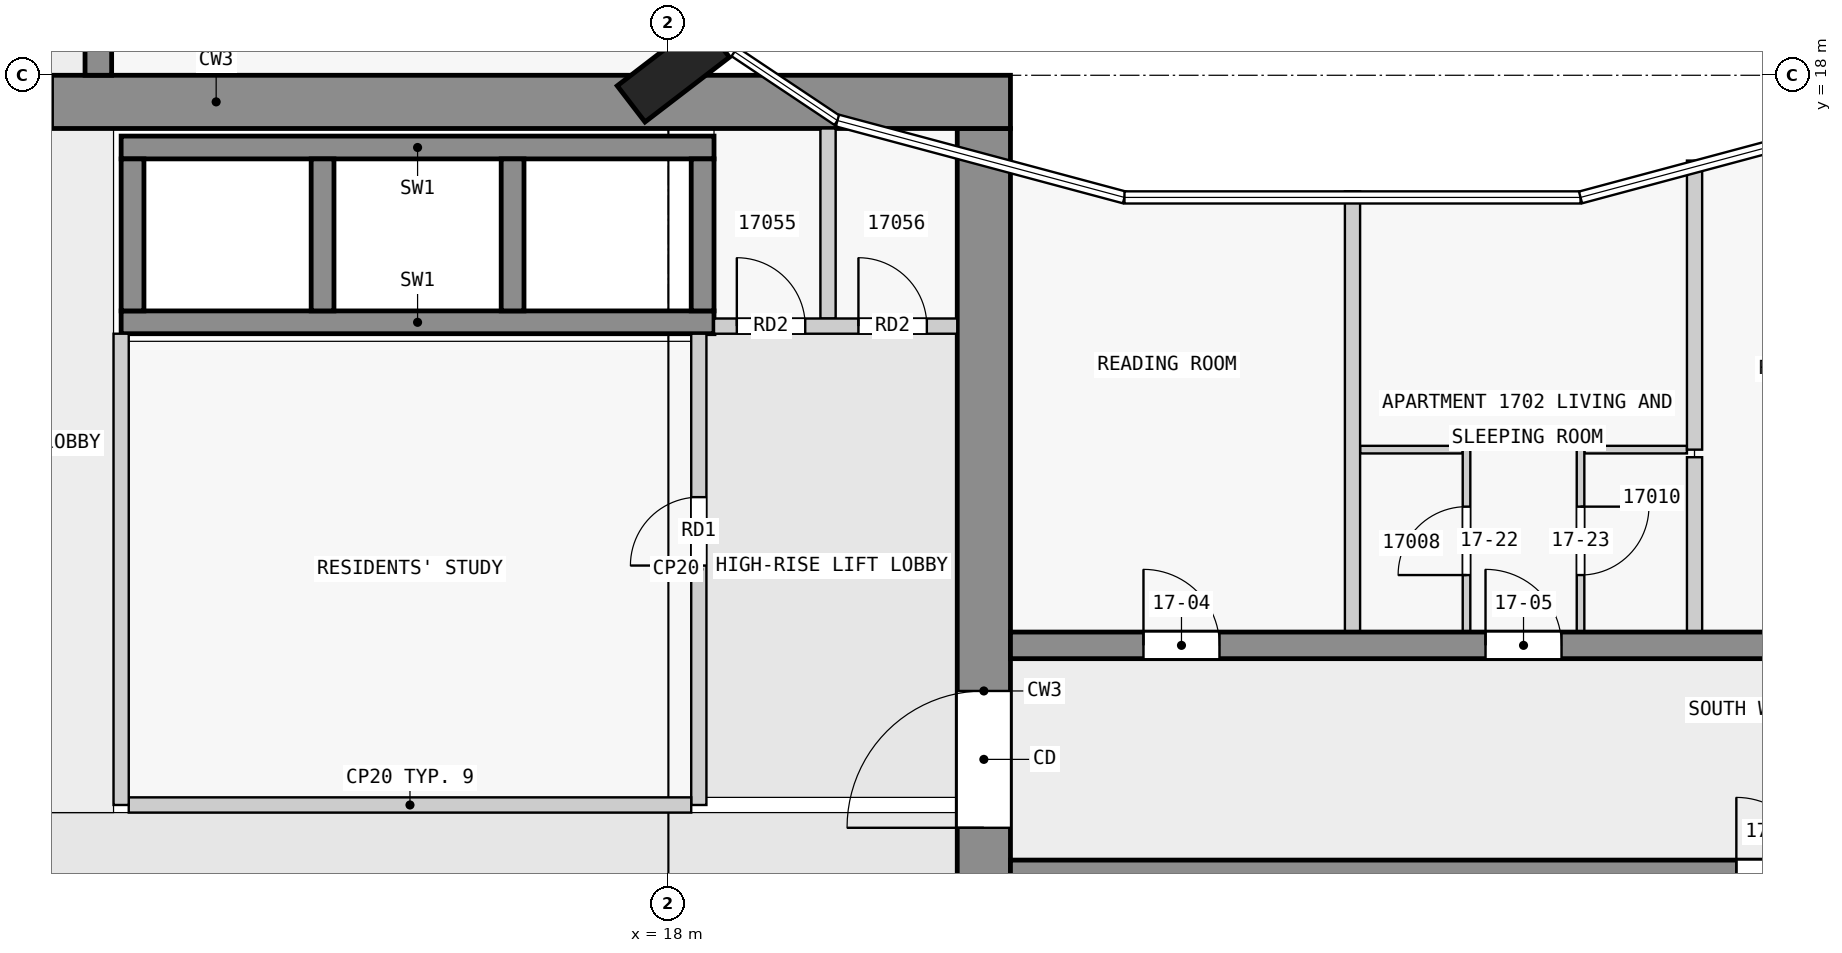
"""IFC4 building model, lengths in metres.
Left out: names, types, materials, properties, quantities, classifications, styles, units other than length and angle.
Written with IfcOpenShell. Run it as: python <this file> out.ifc"""

import sys

from ifc_helpers import new_model, si_unit, direction, frame, frame_2d, origin, origin_2d, place, context, subcontext, project, spatial, rectangle, extrude, element, fill, save


model = new_model("IFC4")
c1 = context("Model", 3, precision=1e-05, world=origin(), true_north=direction((0.0, 1.0)))
c2 = subcontext(c1, "Body", "Model", "MODEL_VIEW")
j1 = project(units=[si_unit("LENGTHUNIT", "METRE"), si_unit("PLANEANGLEUNIT", "RADIAN")], contexts=[c1])
p1 = place(None, origin())
s1 = spatial("IfcSite", under=j1, at=p1, CompositionType="ELEMENT")
p2 = place(p1, origin())
s2 = spatial("IfcBuilding", under=s1, at=p2, CompositionType="ELEMENT")
p3 = place(p2, frame((0.0, 0.0, 68.8)))
s3 = spatial("IfcBuildingStorey", under=s2, at=p3, CompositionType="ELEMENT", Elevation=68.8)
p4 = place(p3, frame((18.065, 18.05, 0.0), z_axis=(0.0, 0.0, 1.0), x_axis=(-0.608810846443, 0.793315418515, 0.0)))
e1 = element("IfcColumn", 1, at=p4, inside=s3, PredefinedType="COLUMN", context=c2, shape_type="SweptSolid", body=[
    extrude(rectangle(XDim=0.6, YDim=1.4, at=origin_2d()), origin(), (0.0, 0.0, 1.0), 3.5),
])
p5 = place(p3, frame((1.6, 17.65, 0.0), z_axis=(0.0, 0.0, 1.0), x_axis=(1.0, 0.0, 0.0)))
e2 = element("IfcWall", 2, at=p5, inside=s3, PredefinedType="SHEAR", context=c2, shape_type="SweptSolid", body=[
    extrude(rectangle(XDim=20.9, YDim=0.7, at=frame_2d((10.45, 0.0))), origin(), (0.0, 0.0, 1.0), 3.2),
])
p6 = place(p5, frame((6.5, 0.0, 0.0)))
e3 = element("IfcOpeningElement", 3, at=p6, cuts=e2, PredefinedType="OPENING", context=c2, shape_type="SweptSolid", body=[
    extrude(rectangle(XDim=1.8, YDim=2.1, at=frame_2d((0.9, 1.05))), frame((0.0, 0.36, 0.0), z_axis=(0.0, -1.0, 0.0), x_axis=(1.0, 0.0, 0.0)), (0.0, 0.0, 1.0), 0.72),
])
p7 = place(p3, frame((22.15, 2.5, 0.0), z_axis=(0.0, 0.0, 1.0), x_axis=(0.0, 1.0, 0.0)))
e4 = element("IfcWall", 4, at=p7, inside=s3, PredefinedType="SHEAR", context=c2, shape_type="SweptSolid", body=[
    extrude(rectangle(XDim=14.8, YDim=0.7, at=frame_2d((7.4, 0.0))), origin(), (0.0, 0.0, 1.0), 3.2),
])
p8 = place(p7, frame((5.6, 0.0, 0.0)))
e5 = element("IfcOpeningElement", 5, at=p8, cuts=e4, PredefinedType="OPENING", context=c2, shape_type="SweptSolid", body=[
    extrude(rectangle(XDim=1.8, YDim=2.1, at=frame_2d((0.9, 1.05))), frame((0.0, 0.36, 0.0), z_axis=(0.0, -1.0, 0.0), x_axis=(1.0, 0.0, 0.0)), (0.0, 0.0, 1.0), 0.72),
])
for number, where, z_axis, x_axis in (
    (6, (10.8, 17.05, 0.0), (0.0, 0.0, 1.0), (1.0, 0.0, 0.0)),
    (7, (10.8, 14.75, 0.0), (0.0, 0.0, 1.0), (1.0, 0.0, 0.0)),
):
    element("IfcWall", number, at=place(p3, frame(where, z_axis=z_axis, x_axis=x_axis)), inside=s3, PredefinedType="SHEAR", context=c2, shape_type="SweptSolid", body=[
        extrude(rectangle(XDim=7.8, YDim=0.3, at=frame_2d((3.9, 0.0))), origin(), (0.0, 0.0, 1.0), 3.2),
    ])
for number, where, z_axis, x_axis in (
    (8, (10.95, 14.9, 0.0), (0.0, 0.0, 1.0), (0.0, 1.0, 0.0)),
    (9, (13.45, 14.9, 0.0), (0.0, 0.0, 1.0), (0.0, 1.0, 0.0)),
    (10, (15.95, 14.9, 0.0), (0.0, 0.0, 1.0), (0.0, 1.0, 0.0)),
    (11, (18.45, 14.9, 0.0), (0.0, 0.0, 1.0), (0.0, 1.0, 0.0)),
):
    element("IfcWall", number, at=place(p3, frame(where, z_axis=z_axis, x_axis=x_axis)), inside=s3, PredefinedType="SHEAR", context=c2, shape_type="SweptSolid", body=[
        extrude(rectangle(XDim=2.0, YDim=0.3, at=frame_2d((1.0, 0.0))), origin(), (0.0, 0.0, 1.0), 3.2),
    ])
p9 = place(p3, frame((22.5, 7.5, 0.0), z_axis=(0.0, 0.0, 1.0), x_axis=(1.0, 0.0, 0.0)))
e12 = element("IfcWall", 12, at=p9, inside=s3, PredefinedType="SHEAR", context=c2, shape_type="SweptSolid", body=[
    extrude(rectangle(XDim=22.5, YDim=0.35, at=frame_2d((11.25, 0.0))), origin(), (0.0, 0.0, 1.0), 3.2),
])
p10 = place(p9, frame((9.55, 0.0, 0.0)))
e13 = element("IfcOpeningElement", 13, at=p10, cuts=e12, PredefinedType="OPENING", context=c2, shape_type="SweptSolid", body=[
    extrude(rectangle(XDim=1.0, YDim=2.1, at=frame_2d((0.5, 1.05))), frame((0.0, 0.185, 0.0), z_axis=(0.0, -1.0, 0.0), x_axis=(1.0, 0.0, 0.0)), (0.0, 0.0, 1.0), 0.37),
])
p11 = place(p9, frame((18.75, 0.0, 0.0)))
e14 = element("IfcOpeningElement", 14, at=p11, cuts=e12, PredefinedType="OPENING", context=c2, shape_type="SweptSolid", body=[
    extrude(rectangle(XDim=0.9, YDim=2.1, at=frame_2d((0.45, 1.05))), frame((0.0, 0.185, 0.0), z_axis=(0.0, -1.0, 0.0), x_axis=(1.0, 0.0, 0.0)), (0.0, 0.0, 1.0), 0.37),
])
p12 = place(p9, frame((20.95, 0.0, 0.0)))
e15 = element("IfcOpeningElement", 15, at=p12, cuts=e12, PredefinedType="OPENING", context=c2, shape_type="SweptSolid", body=[
    extrude(rectangle(XDim=1.0, YDim=2.1, at=frame_2d((0.5, 1.05))), frame((0.0, 0.185, 0.0), z_axis=(0.0, -1.0, 0.0), x_axis=(1.0, 0.0, 0.0)), (0.0, 0.0, 1.0), 0.37),
])
p13 = place(p3, frame((22.5, 10.5, 0.0), z_axis=(0.0, 0.0, 1.0), x_axis=(1.0, 0.0, 0.0)))
e16 = element("IfcWall", 16, at=p13, inside=s3, PredefinedType="SHEAR", context=c2, shape_type="SweptSolid", body=[
    extrude(rectangle(XDim=22.5, YDim=0.35, at=frame_2d((11.25, 0.0))), origin(), (0.0, 0.0, 1.0), 3.2),
])
p14 = place(p13, frame((1.75, 0.0, 0.0)))
e17 = element("IfcOpeningElement", 17, at=p14, cuts=e16, PredefinedType="OPENING", context=c2, shape_type="SweptSolid", body=[
    extrude(rectangle(XDim=1.0, YDim=2.1, at=frame_2d((0.5, 1.05))), frame((0.0, 0.185, 0.0), z_axis=(0.0, -1.0, 0.0), x_axis=(1.0, 0.0, 0.0)), (0.0, 0.0, 1.0), 0.37),
])
p15 = place(p13, frame((6.25, 0.0, 0.0)))
e18 = element("IfcOpeningElement", 18, at=p15, cuts=e16, PredefinedType="OPENING", context=c2, shape_type="SweptSolid", body=[
    extrude(rectangle(XDim=1.0, YDim=2.1, at=frame_2d((0.5, 1.05))), frame((0.0, 0.185, 0.0), z_axis=(0.0, -1.0, 0.0), x_axis=(1.0, 0.0, 0.0)), (0.0, 0.0, 1.0), 0.37),
])
p16 = place(p13, frame((10.75, 0.0, 0.0)))
e19 = element("IfcOpeningElement", 19, at=p16, cuts=e16, PredefinedType="OPENING", context=c2, shape_type="SweptSolid", body=[
    extrude(rectangle(XDim=1.0, YDim=2.1, at=frame_2d((0.5, 1.05))), frame((0.0, 0.185, 0.0), z_axis=(0.0, -1.0, 0.0), x_axis=(1.0, 0.0, 0.0)), (0.0, 0.0, 1.0), 0.37),
])
p17 = place(p13, frame((16.85, 0.0, 0.0)))
e20 = element("IfcOpeningElement", 20, at=p17, cuts=e16, PredefinedType="OPENING", context=c2, shape_type="SweptSolid", body=[
    extrude(rectangle(XDim=1.0, YDim=2.1, at=frame_2d((0.5, 1.05))), frame((0.0, 0.185, 0.0), z_axis=(0.0, -1.0, 0.0), x_axis=(1.0, 0.0, 0.0)), (0.0, 0.0, 1.0), 0.37),
])
p18 = place(p3, frame((10.5, 18.0, 0.0), z_axis=(0.0, 0.0, 1.0), x_axis=(0.0, 1.0, 0.0)))
e21 = element("IfcWall", 21, at=p18, inside=s3, PredefinedType="SHEAR", context=c2, shape_type="SweptSolid", body=[
    extrude(rectangle(XDim=27.0, YDim=0.35, at=frame_2d((13.5, 0.0))), origin(), (0.0, 0.0, 1.0), 3.2),
])
p19 = place(p18, frame((4.05, 0.0, 0.0)))
e22 = element("IfcOpeningElement", 22, at=p19, cuts=e21, PredefinedType="OPENING", context=c2, shape_type="SweptSolid", body=[
    extrude(rectangle(XDim=1.0, YDim=2.1, at=frame_2d((0.5, 1.05))), frame((0.0, 0.185, 0.0), z_axis=(0.0, -1.0, 0.0), x_axis=(1.0, 0.0, 0.0)), (0.0, 0.0, 1.0), 0.37),
])
p20 = place(p18, frame((13.05, 0.0, 0.0)))
e23 = element("IfcOpeningElement", 23, at=p20, cuts=e21, PredefinedType="OPENING", context=c2, shape_type="SweptSolid", body=[
    extrude(rectangle(XDim=1.0, YDim=2.1, at=frame_2d((0.5, 1.05))), frame((0.0, 0.185, 0.0), z_axis=(0.0, -1.0, 0.0), x_axis=(1.0, 0.0, 0.0)), (0.0, 0.0, 1.0), 0.37),
])
p21 = place(p18, frame((21.35, 0.0, 0.0)))
e24 = element("IfcOpeningElement", 24, at=p21, cuts=e21, PredefinedType="OPENING", context=c2, shape_type="SweptSolid", body=[
    extrude(rectangle(XDim=1.0, YDim=2.1, at=frame_2d((0.5, 1.05))), frame((0.0, 0.185, 0.0), z_axis=(0.0, -1.0, 0.0), x_axis=(1.0, 0.0, 0.0)), (0.0, 0.0, 1.0), 0.37),
])
p22 = place(p3, frame((10.8, 8.4, 0.0), z_axis=(0.0, 0.0, 1.0), x_axis=(0.0, 1.0, 0.0)))
e25 = element("IfcWall", 25, at=p22, inside=s3, PredefinedType="PARTITIONING", context=c2, shape_type="SweptSolid", body=[
    extrude(rectangle(XDim=6.2, YDim=0.2, at=frame_2d((3.1, 0.0))), origin(), (0.0, 0.0, 1.0), 3.2),
])
p23 = place(p3, frame((10.9, 8.4, 0.0), z_axis=(0.0, 0.0, 1.0), x_axis=(1.0, 0.0, 0.0)))
e26 = element("IfcWall", 26, at=p23, inside=s3, PredefinedType="PARTITIONING", context=c2, shape_type="SweptSolid", body=[
    extrude(rectangle(XDim=7.4, YDim=0.2, at=frame_2d((3.7, 0.0))), origin(), (0.0, 0.0, 1.0), 3.2),
])
p24 = place(p3, frame((18.4, 8.4, 0.0), z_axis=(0.0, 0.0, 1.0), x_axis=(0.0, 1.0, 0.0)))
e27 = element("IfcWall", 27, at=p24, inside=s3, PredefinedType="PARTITIONING", context=c2, shape_type="SweptSolid", body=[
    extrude(rectangle(XDim=6.2, YDim=0.2, at=frame_2d((3.1, 0.0))), origin(), (0.0, 0.0, 1.0), 3.2),
])
p25 = place(p24, frame((3.15, 0.0, 0.0)))
e28 = element("IfcOpeningElement", 28, at=p25, cuts=e27, PredefinedType="OPENING", context=c2, shape_type="SweptSolid", body=[
    extrude(rectangle(XDim=0.9, YDim=2.1, at=frame_2d((0.45, 1.05))), frame((0.0, 0.11, 0.0), z_axis=(0.0, -1.0, 0.0), x_axis=(1.0, 0.0, 0.0)), (0.0, 0.0, 1.0), 0.22),
])
p26 = place(p3, frame((18.6, 14.7, 0.0), z_axis=(0.0, 0.0, 1.0), x_axis=(1.0, 0.0, 0.0)))
e29 = element("IfcWall", 29, at=p26, inside=s3, PredefinedType="PARTITIONING", context=c2, shape_type="SweptSolid", body=[
    extrude(rectangle(XDim=3.2, YDim=0.2, at=frame_2d((1.6, 0.0))), origin(), (0.0, 0.0, 1.0), 3.2),
])
p27 = place(p26, frame((0.3, 0.0, 0.0)))
e30 = element("IfcOpeningElement", 30, at=p27, cuts=e29, PredefinedType="OPENING", context=c2, shape_type="SweptSolid", body=[
    extrude(rectangle(XDim=0.9, YDim=2.1, at=frame_2d((0.45, 1.05))), frame((0.0, 0.11, 0.0), z_axis=(0.0, -1.0, 0.0), x_axis=(1.0, 0.0, 0.0)), (0.0, 0.0, 1.0), 0.22),
])
p28 = place(p26, frame((1.9, 0.0, 0.0)))
e31 = element("IfcOpeningElement", 31, at=p28, cuts=e29, PredefinedType="OPENING", context=c2, shape_type="SweptSolid", body=[
    extrude(rectangle(XDim=0.9, YDim=2.1, at=frame_2d((0.45, 1.05))), frame((0.0, 0.11, 0.0), z_axis=(0.0, -1.0, 0.0), x_axis=(1.0, 0.0, 0.0)), (0.0, 0.0, 1.0), 0.22),
])
p29 = place(p3, frame((20.1, 14.8, 0.0), z_axis=(0.0, 0.0, 1.0), x_axis=(0.0, 1.0, 0.0)))
e32 = element("IfcWall", 32, at=p29, inside=s3, PredefinedType="PARTITIONING", context=c2, shape_type="SweptSolid", body=[
    extrude(rectangle(XDim=2.5, YDim=0.2, at=frame_2d((1.25, 0.0))), origin(), (0.0, 0.0, 1.0), 3.2),
])
for number, where, z_axis, x_axis in (
    (33, (28.45, 13.075, 0.0), (0.0, 0.0, 1.0), (-1.0, 0.0, 0.0)),
    (34, (31.4, 13.075, 0.0), (0.0, 0.0, 1.0), (-1.0, 0.0, 0.0)),
):
    element("IfcWall", number, at=place(p3, frame(where, z_axis=z_axis, x_axis=x_axis)), inside=s3, PredefinedType="PARTITIONING", context=c2, shape_type="SweptSolid", body=[
        extrude(rectangle(XDim=1.35, YDim=0.1, at=frame_2d((0.675, 0.0))), origin(), (0.0, 0.0, 1.0), 3.2),
    ])
p30 = place(p3, frame((27.0, 10.675, 0.0), z_axis=(0.0, 0.0, 1.0), x_axis=(0.0, 1.0, 0.0)))
e35 = element("IfcWall", 35, at=p30, inside=s3, PredefinedType="PARTITIONING", context=c2, shape_type="SweptSolid", body=[
    extrude(rectangle(XDim=5.798, YDim=0.2, at=frame_2d((2.899, 0.0))), origin(), (0.0, 0.0, 1.0), 3.2),
])
p31 = place(p3, frame((28.5, 10.675, 0.0), z_axis=(0.0, 0.0, 1.0), x_axis=(0.0, 1.0, 0.0)))
e36 = element("IfcWall", 36, at=p31, inside=s3, PredefinedType="PARTITIONING", context=c2, shape_type="SweptSolid", body=[
    extrude(rectangle(XDim=2.4, YDim=0.1, at=frame_2d((1.2, 0.0))), origin(), (0.0, 0.0, 1.0), 3.2),
])
p32 = place(p31, frame((0.75, 0.0, 0.0)))
e37 = element("IfcOpeningElement", 37, at=p32, cuts=e36, PredefinedType="OPENING", context=c2, shape_type="SweptSolid", body=[
    extrude(rectangle(XDim=0.9, YDim=2.1, at=frame_2d((0.45, 1.05))), frame((0.0, 0.06, 0.0), z_axis=(0.0, -1.0, 0.0), x_axis=(1.0, 0.0, 0.0)), (0.0, 0.0, 1.0), 0.12),
])
p33 = place(p3, frame((30.0, 13.075, 0.0), z_axis=(0.0, 0.0, 1.0), x_axis=(0.0, -1.0, 0.0)))
e38 = element("IfcWall", 38, at=p33, inside=s3, PredefinedType="PARTITIONING", context=c2, shape_type="SweptSolid", body=[
    extrude(rectangle(XDim=2.4, YDim=0.1, at=frame_2d((1.2, 0.0))), origin(), (0.0, 0.0, 1.0), 3.2),
])
p34 = place(p33, frame((0.75, 0.0, 0.0)))
e39 = element("IfcOpeningElement", 39, at=p34, cuts=e38, PredefinedType="OPENING", context=c2, shape_type="SweptSolid", body=[
    extrude(rectangle(XDim=0.9, YDim=2.1, at=frame_2d((0.45, 1.05))), frame((0.0, 0.06, 0.0), z_axis=(0.0, -1.0, 0.0), x_axis=(1.0, 0.0, 0.0)), (0.0, 0.0, 1.0), 0.12),
])
p35 = place(p3, frame((31.5, 16.878, 0.0), z_axis=(0.0, 0.0, 1.0), x_axis=(0.0, -1.0, 0.0)))
e40 = element("IfcWall", 40, at=p35, inside=s3, PredefinedType="PARTITIONING", context=c2, shape_type="SweptSolid", body=[
    extrude(rectangle(XDim=3.803, YDim=0.2, at=frame_2d((1.901, 0.0))), origin(), (0.0, 0.0, 1.0), 3.2),
])
p36 = place(p3, frame((31.5, 10.675, 0.0), z_axis=(0.0, 0.0, 1.0), x_axis=(0.0, 1.0, 0.0)))
e41 = element("IfcWall", 41, at=p36, inside=s3, PredefinedType="PARTITIONING", context=c2, shape_type="SweptSolid", body=[
    extrude(rectangle(XDim=2.3, YDim=0.2, at=frame_2d((1.15, 0.0))), origin(), (0.0, 0.0, 1.0), 3.2),
])
p37 = place(p25, origin())
e42 = element("IfcDoor", 42, at=p37, inside=s3, OperationType="SINGLE_SWING_LEFT", PredefinedType="DOOR", context=c2, shape_type="SweptSolid", body=[
    extrude(rectangle(XDim=0.9, YDim=2.1, at=frame_2d((0.45, 1.05))), frame((0.0, 0.025, 0.0), z_axis=(0.0, -1.0, 0.0), x_axis=(1.0, 0.0, 0.0)), (0.0, 0.0, 1.0), 0.05),
])
fill(e28, e42)
p38 = place(p8, origin())
e43 = element("IfcDoor", 43, at=p38, inside=s3, OperationType="DOUBLE_DOOR_SINGLE_SWING", PredefinedType="DOOR", context=c2, shape_type="SweptSolid", body=[
    extrude(rectangle(XDim=1.8, YDim=2.1, at=frame_2d((0.9, 1.05))), frame((0.0, 0.025, 0.0), z_axis=(0.0, -1.0, 0.0), x_axis=(1.0, 0.0, 0.0)), (0.0, 0.0, 1.0), 0.05),
])
fill(e5, e43)
p39 = place(p6, origin())
e44 = element("IfcDoor", 44, at=p39, inside=s3, OperationType="DOUBLE_DOOR_SINGLE_SWING", PredefinedType="DOOR", context=c2, shape_type="SweptSolid", body=[
    extrude(rectangle(XDim=1.8, YDim=2.1, at=frame_2d((0.9, 1.05))), frame((0.0, 0.025, 0.0), z_axis=(0.0, -1.0, 0.0), x_axis=(1.0, 0.0, 0.0)), (0.0, 0.0, 1.0), 0.05),
])
fill(e3, e44)
p40 = place(p27, origin())
e45 = element("IfcDoor", 45, at=p40, inside=s3, OperationType="SINGLE_SWING_LEFT", PredefinedType="DOOR", context=c2, shape_type="SweptSolid", body=[
    extrude(rectangle(XDim=0.9, YDim=2.1, at=frame_2d((0.45, 1.05))), frame((0.0, 0.025, 0.0), z_axis=(0.0, -1.0, 0.0), x_axis=(1.0, 0.0, 0.0)), (0.0, 0.0, 1.0), 0.05),
])
fill(e30, e45)
p41 = place(p28, origin())
e46 = element("IfcDoor", 46, at=p41, inside=s3, OperationType="SINGLE_SWING_LEFT", PredefinedType="DOOR", context=c2, shape_type="SweptSolid", body=[
    extrude(rectangle(XDim=0.9, YDim=2.1, at=frame_2d((0.45, 1.05))), frame((0.0, 0.025, 0.0), z_axis=(0.0, -1.0, 0.0), x_axis=(1.0, 0.0, 0.0)), (0.0, 0.0, 1.0), 0.05),
])
fill(e31, e46)
p42 = place(p10, origin())
e47 = element("IfcDoor", 47, at=p42, inside=s3, OperationType="SINGLE_SWING_LEFT", PredefinedType="DOOR", context=c2, shape_type="SweptSolid", body=[
    extrude(rectangle(XDim=1.0, YDim=2.1, at=frame_2d((0.5, 1.05))), frame((0.0, 0.025, 0.0), z_axis=(0.0, -1.0, 0.0), x_axis=(1.0, 0.0, 0.0)), (0.0, 0.0, 1.0), 0.05),
])
fill(e13, e47)
p43 = place(p14, origin())
e48 = element("IfcDoor", 48, at=p43, inside=s3, OperationType="SINGLE_SWING_LEFT", PredefinedType="DOOR", context=c2, shape_type="SweptSolid", body=[
    extrude(rectangle(XDim=1.0, YDim=2.1, at=frame_2d((0.5, 1.05))), frame((0.0, 0.025, 0.0), z_axis=(0.0, -1.0, 0.0), x_axis=(1.0, 0.0, 0.0)), (0.0, 0.0, 1.0), 0.05),
])
fill(e17, e48)
p44 = place(p15, origin())
e49 = element("IfcDoor", 49, at=p44, inside=s3, OperationType="SINGLE_SWING_LEFT", PredefinedType="DOOR", context=c2, shape_type="SweptSolid", body=[
    extrude(rectangle(XDim=1.0, YDim=2.1, at=frame_2d((0.5, 1.05))), frame((0.0, 0.025, 0.0), z_axis=(0.0, -1.0, 0.0), x_axis=(1.0, 0.0, 0.0)), (0.0, 0.0, 1.0), 0.05),
])
fill(e18, e49)
p45 = place(p32, origin())
e50 = element("IfcDoor", 50, at=p45, inside=s3, OperationType="SINGLE_SWING_RIGHT", PredefinedType="DOOR", context=c2, shape_type="SweptSolid", body=[
    extrude(rectangle(XDim=0.9, YDim=2.1, at=frame_2d((0.45, 1.05))), frame((0.0, 0.025, 0.0), z_axis=(0.0, -1.0, 0.0), x_axis=(1.0, 0.0, 0.0)), (0.0, 0.0, 1.0), 0.05),
])
fill(e37, e50)
p46 = place(p34, origin())
e51 = element("IfcDoor", 51, at=p46, inside=s3, OperationType="SINGLE_SWING_RIGHT", PredefinedType="DOOR", context=c2, shape_type="SweptSolid", body=[
    extrude(rectangle(XDim=0.9, YDim=2.1, at=frame_2d((0.45, 1.05))), frame((0.0, 0.025, 0.0), z_axis=(0.0, -1.0, 0.0), x_axis=(1.0, 0.0, 0.0)), (0.0, 0.0, 1.0), 0.05),
])
fill(e39, e51)
save(model, sys.argv[1])
